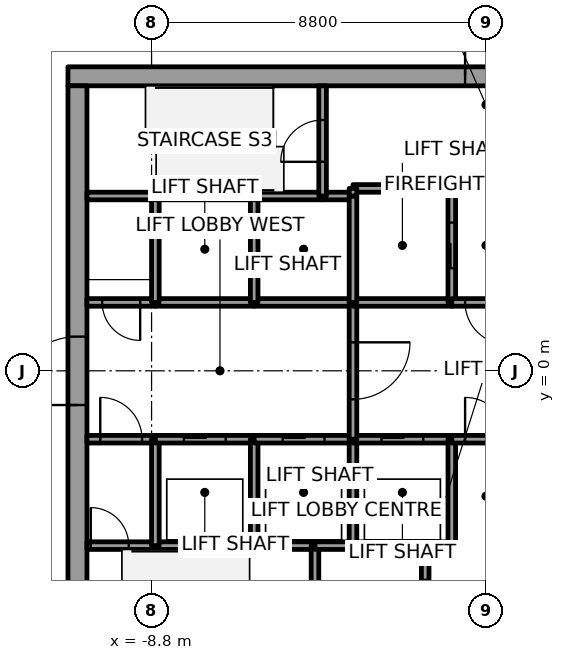
"""IFC4 building model, lengths in metres.
Left out: names, types, materials, properties, quantities, classifications, styles, units other than length and angle.
Written with IfcOpenShell. Run it as: python <this file> out.ifc"""

import sys

from ifc_helpers import new_model, si_unit, direction, frame, frame_2d, origin, place, context, subcontext, project, spatial, rectangle, extrude, element, fill, save


model = new_model("IFC4")
c1 = context("Model", 3, precision=1e-05, world=origin(), true_north=direction((0.0, 1.0)))
c2 = subcontext(c1, "Body", "Model", "MODEL_VIEW")
j1 = project(units=[si_unit("LENGTHUNIT", "METRE"), si_unit("PLANEANGLEUNIT", "RADIAN")], contexts=[c1])
p1 = place(None, origin())
s1 = spatial("IfcSite", under=j1, at=p1, CompositionType="ELEMENT")
p2 = place(p1, origin())
s2 = spatial("IfcBuilding", under=s1, at=p2, CompositionType="ELEMENT")
p3 = place(p2, frame((0.0, 0.0, 169.8)))
s3 = spatial("IfcBuildingStorey", under=s2, at=p3, CompositionType="ELEMENT", Elevation=169.8)
p4 = place(p3, frame((-11.0, 7.75, 0.0), z_axis=(0.0, 0.0, 1.0), x_axis=(1.0, 0.0, 0.0)))
e1 = element("IfcWall", 1, at=p4, inside=s3, PredefinedType="SHEAR", context=c2, shape_type="SweptSolid", body=[
    extrude(rectangle(XDim=22.0, YDim=0.5, at=frame_2d((11.0, 0.0))), origin(), (0.0, 0.0, 1.0), 4.0),
])
p5 = place(p4, frame((10.45, 0.0, 0.0)))
e2 = element("IfcOpeningElement", 2, at=p5, cuts=e1, PredefinedType="OPENING", context=c2, shape_type="SweptSolid", body=[
    extrude(rectangle(XDim=1.1, YDim=2.1, at=frame_2d((0.55, 1.05))), frame((0.0, 0.25, 0.0), z_axis=(0.0, -1.0, 0.0), x_axis=(1.0, 0.0, 0.0)), (0.0, 0.0, 1.0), 0.5),
])
p6 = place(p3, frame((-10.75, -7.5, 0.0), z_axis=(0.0, 0.0, 1.0), x_axis=(0.0, 1.0, 0.0)))
e3 = element("IfcWall", 3, at=p6, inside=s3, PredefinedType="SHEAR", context=c2, shape_type="SweptSolid", body=[
    extrude(rectangle(XDim=15.0, YDim=0.5, at=frame_2d((7.5, 0.0))), origin(), (0.0, 0.0, 1.0), 4.0),
])
p7 = place(p6, frame((6.6, 0.0, 0.0)))
e4 = element("IfcOpeningElement", 4, at=p7, cuts=e3, PredefinedType="OPENING", context=c2, shape_type="SweptSolid", body=[
    extrude(rectangle(XDim=1.8, YDim=2.1, at=frame_2d((0.9, 1.05))), frame((0.0, 0.25, 0.0), z_axis=(0.0, -1.0, 0.0), x_axis=(1.0, 0.0, 0.0)), (0.0, 0.0, 1.0), 0.5),
])
p8 = place(p3, frame((-10.5, -4.6, 0.0), z_axis=(0.0, 0.0, 1.0), x_axis=(1.0, 0.0, 0.0)))
e5 = element("IfcWall", 5, at=p8, inside=s3, PredefinedType="SOLIDWALL", context=c2, shape_type="SweptSolid", body=[
    extrude(rectangle(XDim=1.8, YDim=0.2, at=frame_2d((0.9, 0.0))), origin(), (0.0, 0.0, 1.0), 3.85),
])
p9 = place(p8, frame((0.1, 0.0, 0.0)))
e6 = element("IfcOpeningElement", 6, at=p9, cuts=e5, PredefinedType="OPENING", context=c2, shape_type="SweptSolid", body=[
    extrude(rectangle(XDim=1.0, YDim=2.1, at=frame_2d((0.5, 1.05))), frame((0.0, 0.1, 0.0), z_axis=(0.0, -1.0, 0.0), x_axis=(1.0, 0.0, 0.0)), (0.0, 0.0, 1.0), 0.2),
])
p10 = place(p3, frame((-10.5, -1.8, 0.0), z_axis=(0.0, 0.0, 1.0), x_axis=(1.0, 0.0, 0.0)))
e7 = element("IfcWall", 7, at=p10, inside=s3, PredefinedType="SOLIDWALL", context=c2, shape_type="SweptSolid", body=[
    extrude(rectangle(XDim=1.8, YDim=0.2, at=frame_2d((0.9, 0.0))), origin(), (0.0, 0.0, 1.0), 3.85),
])
p11 = place(p10, frame((0.35, 0.0, 0.0)))
e8 = element("IfcOpeningElement", 8, at=p11, cuts=e7, PredefinedType="OPENING", context=c2, shape_type="SweptSolid", body=[
    extrude(rectangle(XDim=1.1, YDim=2.1, at=frame_2d((0.55, 1.05))), frame((0.0, 0.1, 0.0), z_axis=(0.0, -1.0, 0.0), x_axis=(1.0, 0.0, 0.0)), (0.0, 0.0, 1.0), 0.2),
])
p12 = place(p3, frame((-8.7, 1.8, 0.0), z_axis=(0.0, 0.0, 1.0), x_axis=(-1.0, 0.0, 0.0)))
e9 = element("IfcWall", 9, at=p12, inside=s3, PredefinedType="SOLIDWALL", context=c2, shape_type="SweptSolid", body=[
    extrude(rectangle(XDim=1.8, YDim=0.2, at=frame_2d((0.9, 0.0))), origin(), (0.0, 0.0, 1.0), 3.85),
])
p13 = place(p12, frame((0.4, 0.0, 0.0)))
e10 = element("IfcOpeningElement", 10, at=p13, cuts=e9, PredefinedType="OPENING", context=c2, shape_type="SweptSolid", body=[
    extrude(rectangle(XDim=1.0, YDim=2.1, at=frame_2d((0.5, 1.05))), frame((0.0, 0.1, 0.0), z_axis=(0.0, -1.0, 0.0), x_axis=(1.0, 0.0, 0.0)), (0.0, 0.0, 1.0), 0.2),
])
p14 = place(p3, frame((-8.7, 4.6, 0.0), z_axis=(0.0, 0.0, 1.0), x_axis=(-1.0, 0.0, 0.0)))
e11 = element("IfcWall", 11, at=p14, inside=s3, PredefinedType="SOLIDWALL", context=c2, shape_type="SweptSolid", body=[
    extrude(rectangle(XDim=1.8, YDim=0.2, at=frame_2d((0.9, 0.0))), origin(), (0.0, 0.0, 1.0), 3.85),
])
p15 = place(p3, frame((-8.7, -4.6, 0.0), z_axis=(0.0, 0.0, 1.0), x_axis=(1.0, 0.0, 0.0)))
e12 = element("IfcWall", 12, at=p15, inside=s3, PredefinedType="SOLIDWALL", context=c2, shape_type="SweptSolid", body=[
    extrude(rectangle(XDim=2.6, YDim=0.2, at=frame_2d((1.3, 0.0))), origin(), (0.0, 0.0, 1.0), 3.85),
])
p16 = place(p3, frame((-8.7, -4.6, 0.0), z_axis=(0.0, 0.0, 1.0), x_axis=(0.0, 1.0, 0.0)))
e13 = element("IfcWall", 13, at=p16, inside=s3, PredefinedType="SOLIDWALL", context=c2, shape_type="SweptSolid", body=[
    extrude(rectangle(XDim=2.8, YDim=0.2, at=frame_2d((1.4, 0.0))), origin(), (0.0, 0.0, 1.0), 3.85),
])
p17 = place(p3, frame((-8.7, -1.8, 0.0), z_axis=(0.0, 0.0, 1.0), x_axis=(1.0, 0.0, 0.0)))
e14 = element("IfcWall", 14, at=p17, inside=s3, PredefinedType="SOLIDWALL", context=c2, shape_type="SweptSolid", body=[
    extrude(rectangle(XDim=2.6, YDim=0.2, at=frame_2d((1.3, 0.0))), origin(), (0.0, 0.0, 1.0), 3.85),
])
p18 = place(p17, frame((0.75, 0.0, 0.0)))
e15 = element("IfcOpeningElement", 15, at=p18, cuts=e14, PredefinedType="OPENING", context=c2, shape_type="SweptSolid", body=[
    extrude(rectangle(XDim=1.1, YDim=2.1, at=frame_2d((0.55, 1.05))), frame((0.0, 0.1, 0.0), z_axis=(0.0, -1.0, 0.0), x_axis=(1.0, 0.0, 0.0)), (0.0, 0.0, 1.0), 0.2),
])
p19 = place(p3, frame((-6.1, 1.8, 0.0), z_axis=(0.0, 0.0, 1.0), x_axis=(-1.0, 0.0, 0.0)))
e16 = element("IfcWall", 16, at=p19, inside=s3, PredefinedType="SOLIDWALL", context=c2, shape_type="SweptSolid", body=[
    extrude(rectangle(XDim=2.6, YDim=0.2, at=frame_2d((1.3, 0.0))), origin(), (0.0, 0.0, 1.0), 3.85),
])
p20 = place(p3, frame((-8.7, 1.8, 0.0), z_axis=(0.0, 0.0, 1.0), x_axis=(0.0, 1.0, 0.0)))
e17 = element("IfcWall", 17, at=p20, inside=s3, PredefinedType="SOLIDWALL", context=c2, shape_type="SweptSolid", body=[
    extrude(rectangle(XDim=2.8, YDim=0.2, at=frame_2d((1.4, 0.0))), origin(), (0.0, 0.0, 1.0), 3.85),
])
p21 = place(p3, frame((-6.1, 4.6, 0.0), z_axis=(0.0, 0.0, 1.0), x_axis=(-1.0, 0.0, 0.0)))
e18 = element("IfcWall", 18, at=p21, inside=s3, PredefinedType="SOLIDWALL", context=c2, shape_type="SweptSolid", body=[
    extrude(rectangle(XDim=2.6, YDim=0.2, at=frame_2d((1.3, 0.0))), origin(), (0.0, 0.0, 1.0), 3.85),
])
p22 = place(p3, frame((-6.1, -4.6, 0.0), z_axis=(0.0, 0.0, 1.0), x_axis=(1.0, 0.0, 0.0)))
e19 = element("IfcWall", 19, at=p22, inside=s3, PredefinedType="SOLIDWALL", context=c2, shape_type="SweptSolid", body=[
    extrude(rectangle(XDim=1.6, YDim=0.2, at=frame_2d((0.8, 0.0))), origin(), (0.0, 0.0, 1.0), 3.85),
])
p23 = place(p3, frame((-6.1, -4.6, 0.0), z_axis=(0.0, 0.0, 1.0), x_axis=(0.0, 1.0, 0.0)))
e20 = element("IfcWall", 20, at=p23, inside=s3, PredefinedType="SOLIDWALL", context=c2, shape_type="SweptSolid", body=[
    extrude(rectangle(XDim=2.8, YDim=0.2, at=frame_2d((1.4, 0.0))), origin(), (0.0, 0.0, 1.0), 3.85),
])
p24 = place(p3, frame((-6.1, -1.8, 0.0), z_axis=(0.0, 0.0, 1.0), x_axis=(1.0, 0.0, 0.0)))
e21 = element("IfcWall", 21, at=p24, inside=s3, PredefinedType="SOLIDWALL", context=c2, shape_type="SweptSolid", body=[
    extrude(rectangle(XDim=2.6, YDim=0.2, at=frame_2d((1.3, 0.0))), origin(), (0.0, 0.0, 1.0), 3.85),
])
p25 = place(p24, frame((0.75, 0.0, 0.0)))
e22 = element("IfcOpeningElement", 22, at=p25, cuts=e21, PredefinedType="OPENING", context=c2, shape_type="SweptSolid", body=[
    extrude(rectangle(XDim=1.1, YDim=2.1, at=frame_2d((0.55, 1.05))), frame((0.0, 0.1, 0.0), z_axis=(0.0, -1.0, 0.0), x_axis=(1.0, 0.0, 0.0)), (0.0, 0.0, 1.0), 0.2),
])
p26 = place(p3, frame((-3.5, 1.8, 0.0), z_axis=(0.0, 0.0, 1.0), x_axis=(-1.0, 0.0, 0.0)))
e23 = element("IfcWall", 23, at=p26, inside=s3, PredefinedType="SOLIDWALL", context=c2, shape_type="SweptSolid", body=[
    extrude(rectangle(XDim=2.6, YDim=0.2, at=frame_2d((1.3, 0.0))), origin(), (0.0, 0.0, 1.0), 3.85),
])
p27 = place(p3, frame((-6.1, 1.8, 0.0), z_axis=(0.0, 0.0, 1.0), x_axis=(0.0, 1.0, 0.0)))
e24 = element("IfcWall", 24, at=p27, inside=s3, PredefinedType="SOLIDWALL", context=c2, shape_type="SweptSolid", body=[
    extrude(rectangle(XDim=2.8, YDim=0.2, at=frame_2d((1.4, 0.0))), origin(), (0.0, 0.0, 1.0), 3.85),
])
p28 = place(p3, frame((-4.3, 4.6, 0.0), z_axis=(0.0, 0.0, 1.0), x_axis=(-1.0, 0.0, 0.0)))
e25 = element("IfcWall", 25, at=p28, inside=s3, PredefinedType="SOLIDWALL", context=c2, shape_type="SweptSolid", body=[
    extrude(rectangle(XDim=1.8, YDim=0.2, at=frame_2d((0.9, 0.0))), origin(), (0.0, 0.0, 1.0), 3.85),
])
p29 = place(p3, frame((-4.5, -4.6, 0.0), z_axis=(0.0, 0.0, 1.0), x_axis=(0.0, -1.0, 0.0)))
e26 = element("IfcWall", 26, at=p29, inside=s3, PredefinedType="SOLIDWALL", context=c2, shape_type="SweptSolid", body=[
    extrude(rectangle(XDim=2.9, YDim=0.2, at=frame_2d((1.45, 0.0))), origin(), (0.0, 0.0, 1.0), 3.85),
])
p30 = place(p3, frame((-4.5, -4.6, 0.0), z_axis=(0.0, 0.0, 1.0), x_axis=(1.0, 0.0, 0.0)))
e27 = element("IfcWall", 27, at=p30, inside=s3, PredefinedType="SOLIDWALL", context=c2, shape_type="SweptSolid", body=[
    extrude(rectangle(XDim=1.0, YDim=0.2, at=frame_2d((0.5, 0.0))), origin(), (0.0, 0.0, 1.0), 3.85),
])
p31 = place(p3, frame((-3.5, 4.6, 0.0), z_axis=(0.0, 0.0, 1.0), x_axis=(-1.0, 0.0, 0.0)))
e28 = element("IfcWall", 28, at=p31, inside=s3, PredefinedType="SOLIDWALL", context=c2, shape_type="SweptSolid", body=[
    extrude(rectangle(XDim=0.8, YDim=0.2, at=frame_2d((0.4, 0.0))), origin(), (0.0, 0.0, 1.0), 3.85),
])
p32 = place(p3, frame((-4.3, 4.6, 0.0), z_axis=(0.0, 0.0, 1.0), x_axis=(0.0, 1.0, 0.0)))
e29 = element("IfcWall", 29, at=p32, inside=s3, PredefinedType="SOLIDWALL", context=c2, shape_type="SweptSolid", body=[
    extrude(rectangle(XDim=2.9, YDim=0.2, at=frame_2d((1.45, 0.0))), origin(), (0.0, 0.0, 1.0), 3.85),
])
p33 = place(p32, frame((0.9, 0.0, 0.0)))
e30 = element("IfcOpeningElement", 30, at=p33, cuts=e29, PredefinedType="OPENING", context=c2, shape_type="SweptSolid", body=[
    extrude(rectangle(XDim=1.1, YDim=2.1, at=frame_2d((0.55, 1.05))), frame((0.0, 0.1, 0.0), z_axis=(0.0, -1.0, 0.0), x_axis=(1.0, 0.0, 0.0)), (0.0, 0.0, 1.0), 0.2),
])
p34 = place(p3, frame((-3.5, -4.6, 0.0), z_axis=(0.0, 0.0, 1.0), x_axis=(1.0, 0.0, 0.0)))
e31 = element("IfcWall", 31, at=p34, inside=s3, PredefinedType="SOLIDWALL", context=c2, shape_type="SweptSolid", body=[
    extrude(rectangle(XDim=1.9, YDim=0.2, at=frame_2d((0.95, 0.0))), origin(), (0.0, 0.0, 1.0), 3.85),
])
p35 = place(p3, frame((-3.5, -4.6, 0.0), z_axis=(0.0, 0.0, 1.0), x_axis=(0.0, 1.0, 0.0)))
e32 = element("IfcWall", 32, at=p35, inside=s3, PredefinedType="SOLIDWALL", context=c2, shape_type="SweptSolid", body=[
    extrude(rectangle(XDim=2.8, YDim=0.2, at=frame_2d((1.4, 0.0))), origin(), (0.0, 0.0, 1.0), 3.85),
])
p36 = place(p3, frame((-3.5, -1.8, 0.0), z_axis=(0.0, 0.0, 1.0), x_axis=(1.0, 0.0, 0.0)))
e33 = element("IfcWall", 33, at=p36, inside=s3, PredefinedType="SOLIDWALL", context=c2, shape_type="SweptSolid", body=[
    extrude(rectangle(XDim=2.6, YDim=0.2, at=frame_2d((1.3, 0.0))), origin(), (0.0, 0.0, 1.0), 3.85),
])
p37 = place(p36, frame((0.75, 0.0, 0.0)))
e34 = element("IfcOpeningElement", 34, at=p37, cuts=e33, PredefinedType="OPENING", context=c2, shape_type="SweptSolid", body=[
    extrude(rectangle(XDim=1.1, YDim=2.1, at=frame_2d((0.55, 1.05))), frame((0.0, 0.1, 0.0), z_axis=(0.0, -1.0, 0.0), x_axis=(1.0, 0.0, 0.0)), (0.0, 0.0, 1.0), 0.2),
])
p38 = place(p3, frame((-3.5, 1.8, 0.0), z_axis=(0.0, 0.0, 1.0), x_axis=(0.0, -1.0, 0.0)))
e35 = element("IfcWall", 35, at=p38, inside=s3, PredefinedType="SOLIDWALL", context=c2, shape_type="SweptSolid", body=[
    extrude(rectangle(XDim=3.6, YDim=0.2, at=frame_2d((1.8, 0.0))), origin(), (0.0, 0.0, 1.0), 3.85),
])
p39 = place(p38, frame((1.05, 0.0, 0.0)))
e36 = element("IfcOpeningElement", 36, at=p39, cuts=e35, PredefinedType="OPENING", context=c2, shape_type="SweptSolid", body=[
    extrude(rectangle(XDim=1.5, YDim=2.1, at=frame_2d((0.75, 1.05))), frame((0.0, 0.1, 0.0), z_axis=(0.0, -1.0, 0.0), x_axis=(1.0, 0.0, 0.0)), (0.0, 0.0, 1.0), 0.2),
])
p40 = place(p3, frame((-0.9, 1.8, 0.0), z_axis=(0.0, 0.0, 1.0), x_axis=(-1.0, 0.0, 0.0)))
e37 = element("IfcWall", 37, at=p40, inside=s3, PredefinedType="SOLIDWALL", context=c2, shape_type="SweptSolid", body=[
    extrude(rectangle(XDim=2.6, YDim=0.2, at=frame_2d((1.3, 0.0))), origin(), (0.0, 0.0, 1.0), 3.85),
])
p41 = place(p3, frame((-3.5, 4.6, 0.0), z_axis=(0.0, 0.0, 1.0), x_axis=(0.0, -1.0, 0.0)))
e38 = element("IfcWall", 38, at=p41, inside=s3, PredefinedType="SOLIDWALL", context=c2, shape_type="SweptSolid", body=[
    extrude(rectangle(XDim=2.8, YDim=0.2, at=frame_2d((1.4, 0.0))), origin(), (0.0, 0.0, 1.0), 3.85),
])
p42 = place(p3, frame((-0.9, 1.8, 0.0), z_axis=(0.0, 0.0, 1.0), x_axis=(0.0, 1.0, 0.0)))
e39 = element("IfcWall", 39, at=p42, inside=s3, PredefinedType="SOLIDWALL", context=c2, shape_type="SweptSolid", body=[
    extrude(rectangle(XDim=3.0, YDim=0.2, at=frame_2d((1.5, 0.0))), origin(), (0.0, 0.0, 1.0), 3.85),
])
p43 = place(p42, frame((0.9, 0.0, 0.0)))
e40 = element("IfcOpeningElement", 40, at=p43, cuts=e39, PredefinedType="OPENING", context=c2, shape_type="SweptSolid", body=[
    extrude(rectangle(XDim=1.2, YDim=2.1, at=frame_2d((0.6, 1.05))), frame((0.0, 0.1, 0.0), z_axis=(0.0, -1.0, 0.0), x_axis=(1.0, 0.0, 0.0)), (0.0, 0.0, 1.0), 0.2),
])
p44 = place(p3, frame((-0.9, 4.8, 0.0), z_axis=(0.0, 0.0, 1.0), x_axis=(-1.0, 0.0, 0.0)))
e41 = element("IfcWall", 41, at=p44, inside=s3, PredefinedType="SOLIDWALL", context=c2, shape_type="SweptSolid", body=[
    extrude(rectangle(XDim=2.6, YDim=0.2, at=frame_2d((1.3, 0.0))), origin(), (0.0, 0.0, 1.0), 3.85),
])
p45 = place(p3, frame((-3.5, 4.8, 0.0), z_axis=(0.0, 0.0, 1.0), x_axis=(0.0, -1.0, 0.0)))
e42 = element("IfcWall", 42, at=p45, inside=s3, PredefinedType="SOLIDWALL", context=c2, shape_type="SweptSolid", body=[
    extrude(rectangle(XDim=0.2, YDim=0.2, at=frame_2d((0.1, 0.0))), origin(), (0.0, 0.0, 1.0), 3.85),
])
p46 = place(p3, frame((-1.6, -7.5, 0.0), z_axis=(0.0, 0.0, 1.0), x_axis=(0.0, 1.0, 0.0)))
e43 = element("IfcWall", 43, at=p46, inside=s3, PredefinedType="SOLIDWALL", context=c2, shape_type="SweptSolid", body=[
    extrude(rectangle(XDim=2.9, YDim=0.2, at=frame_2d((1.45, 0.0))), origin(), (0.0, 0.0, 1.0), 3.85),
])
p47 = place(p46, frame((0.9, 0.0, 0.0)))
e44 = element("IfcOpeningElement", 44, at=p47, cuts=e43, PredefinedType="OPENING", context=c2, shape_type="SweptSolid", body=[
    extrude(rectangle(XDim=1.1, YDim=2.1, at=frame_2d((0.55, 1.05))), frame((0.0, 0.1, 0.0), z_axis=(0.0, -1.0, 0.0), x_axis=(1.0, 0.0, 0.0)), (0.0, 0.0, 1.0), 0.2),
])
p48 = place(p3, frame((-1.6, -4.6, 0.0), z_axis=(0.0, 0.0, 1.0), x_axis=(1.0, 0.0, 0.0)))
e45 = element("IfcWall", 45, at=p48, inside=s3, PredefinedType="SOLIDWALL", context=c2, shape_type="SweptSolid", body=[
    extrude(rectangle(XDim=0.7, YDim=0.2, at=frame_2d((0.35, 0.0))), origin(), (0.0, 0.0, 1.0), 3.85),
])
p49 = place(p3, frame((-0.9, -4.6, 0.0), z_axis=(0.0, 0.0, 1.0), x_axis=(0.0, 1.0, 0.0)))
e46 = element("IfcWall", 46, at=p49, inside=s3, PredefinedType="SOLIDWALL", context=c2, shape_type="SweptSolid", body=[
    extrude(rectangle(XDim=2.8, YDim=0.2, at=frame_2d((1.4, 0.0))), origin(), (0.0, 0.0, 1.0), 3.85),
])
p50 = place(p3, frame((-0.9, -1.8, 0.0), z_axis=(0.0, 0.0, 1.0), x_axis=(1.0, 0.0, 0.0)))
e47 = element("IfcWall", 47, at=p50, inside=s3, PredefinedType="SOLIDWALL", context=c2, shape_type="SweptSolid", body=[
    extrude(rectangle(XDim=1.8, YDim=0.2, at=frame_2d((0.9, 0.0))), origin(), (0.0, 0.0, 1.0), 3.85),
])
p51 = place(p50, frame((0.35, 0.0, 0.0)))
e48 = element("IfcOpeningElement", 48, at=p51, cuts=e47, PredefinedType="OPENING", context=c2, shape_type="SweptSolid", body=[
    extrude(rectangle(XDim=1.1, YDim=2.1, at=frame_2d((0.55, 1.05))), frame((0.0, 0.1, 0.0), z_axis=(0.0, -1.0, 0.0), x_axis=(1.0, 0.0, 0.0)), (0.0, 0.0, 1.0), 0.2),
])
p52 = place(p3, frame((0.9, 1.8, 0.0), z_axis=(0.0, 0.0, 1.0), x_axis=(-1.0, 0.0, 0.0)))
e49 = element("IfcWall", 49, at=p52, inside=s3, PredefinedType="SOLIDWALL", context=c2, shape_type="SweptSolid", body=[
    extrude(rectangle(XDim=1.8, YDim=0.2, at=frame_2d((0.9, 0.0))), origin(), (0.0, 0.0, 1.0), 3.85),
])
p53 = place(p52, frame((0.35, 0.0, 0.0)))
e50 = element("IfcOpeningElement", 50, at=p53, cuts=e49, PredefinedType="OPENING", context=c2, shape_type="SweptSolid", body=[
    extrude(rectangle(XDim=1.1, YDim=2.1, at=frame_2d((0.55, 1.05))), frame((0.0, 0.1, 0.0), z_axis=(0.0, -1.0, 0.0), x_axis=(1.0, 0.0, 0.0)), (0.0, 0.0, 1.0), 0.2),
])
p54 = place(p18, origin())
e51 = element("IfcDoor", 51, at=p54, inside=s3, OperationType="SLIDING_TO_RIGHT", PredefinedType="DOOR", context=c2, shape_type="SweptSolid", body=[
    extrude(rectangle(XDim=1.1, YDim=2.1, at=frame_2d((0.55, 1.05))), frame((0.0, 0.025, 0.0), z_axis=(0.0, -1.0, 0.0), x_axis=(1.0, 0.0, 0.0)), (0.0, 0.0, 1.0), 0.05),
])
fill(e15, e51)
p55 = place(p25, origin())
e52 = element("IfcDoor", 52, at=p55, inside=s3, OperationType="SLIDING_TO_LEFT", PredefinedType="DOOR", context=c2, shape_type="SweptSolid", body=[
    extrude(rectangle(XDim=1.1, YDim=2.1, at=frame_2d((0.55, 1.05))), frame((0.0, 0.025, 0.0), z_axis=(0.0, -1.0, 0.0), x_axis=(1.0, 0.0, 0.0)), (0.0, 0.0, 1.0), 0.05),
])
fill(e22, e52)
p56 = place(p37, origin())
e53 = element("IfcDoor", 53, at=p56, inside=s3, OperationType="SLIDING_TO_RIGHT", PredefinedType="DOOR", context=c2, shape_type="SweptSolid", body=[
    extrude(rectangle(XDim=1.1, YDim=2.1, at=frame_2d((0.55, 1.05))), frame((0.0, 0.025, 0.0), z_axis=(0.0, -1.0, 0.0), x_axis=(1.0, 0.0, 0.0)), (0.0, 0.0, 1.0), 0.05),
])
fill(e34, e53)
p57 = place(p43, origin())
e54 = element("IfcDoor", 54, at=p57, inside=s3, OperationType="SLIDING_TO_LEFT", PredefinedType="DOOR", context=c2, shape_type="SweptSolid", body=[
    extrude(rectangle(XDim=1.2, YDim=2.1, at=frame_2d((0.6, 1.05))), frame((0.0, 0.025, 0.0), z_axis=(0.0, -1.0, 0.0), x_axis=(1.0, 0.0, 0.0)), (0.0, 0.0, 1.0), 0.05),
])
fill(e40, e54)
p58 = place(p39, origin())
e55 = element("IfcDoor", 55, at=p58, inside=s3, OperationType="DOUBLE_DOOR_SINGLE_SWING", PredefinedType="DOOR", context=c2, shape_type="SweptSolid", body=[
    extrude(rectangle(XDim=1.5, YDim=2.1, at=frame_2d((0.75, 1.05))), frame((0.0, 0.025, 0.0), z_axis=(0.0, -1.0, 0.0), x_axis=(1.0, 0.0, 0.0)), (0.0, 0.0, 1.0), 0.05),
])
fill(e36, e55)
p59 = place(p11, origin())
e56 = element("IfcDoor", 56, at=p59, inside=s3, OperationType="SINGLE_SWING_RIGHT", PredefinedType="DOOR", context=c2, shape_type="SweptSolid", body=[
    extrude(rectangle(XDim=1.1, YDim=2.1, at=frame_2d((0.55, 1.05))), frame((0.0, 0.025, 0.0), z_axis=(0.0, -1.0, 0.0), x_axis=(1.0, 0.0, 0.0)), (0.0, 0.0, 1.0), 0.05),
])
fill(e8, e56)
p60 = place(p53, origin())
e57 = element("IfcDoor", 57, at=p60, inside=s3, OperationType="SINGLE_SWING_LEFT", PredefinedType="DOOR", context=c2, shape_type="SweptSolid", body=[
    extrude(rectangle(XDim=1.1, YDim=2.1, at=frame_2d((0.55, 1.05))), frame((0.0, 0.025, 0.0), z_axis=(0.0, -1.0, 0.0), x_axis=(1.0, 0.0, 0.0)), (0.0, 0.0, 1.0), 0.05),
])
fill(e50, e57)
p61 = place(p51, origin())
e58 = element("IfcDoor", 58, at=p61, inside=s3, OperationType="SINGLE_SWING_LEFT", PredefinedType="DOOR", context=c2, shape_type="SweptSolid", body=[
    extrude(rectangle(XDim=1.1, YDim=2.1, at=frame_2d((0.55, 1.05))), frame((0.0, 0.025, 0.0), z_axis=(0.0, -1.0, 0.0), x_axis=(1.0, 0.0, 0.0)), (0.0, 0.0, 1.0), 0.05),
])
fill(e48, e58)
p62 = place(p13, origin())
e59 = element("IfcDoor", 59, at=p62, inside=s3, OperationType="SINGLE_SWING_LEFT", PredefinedType="DOOR", context=c2, shape_type="SweptSolid", body=[
    extrude(rectangle(XDim=1.0, YDim=2.1, at=frame_2d((0.5, 1.05))), frame((0.0, 0.025, 0.0), z_axis=(0.0, -1.0, 0.0), x_axis=(1.0, 0.0, 0.0)), (0.0, 0.0, 1.0), 0.05),
])
fill(e10, e59)
p63 = place(p9, origin())
e60 = element("IfcDoor", 60, at=p63, inside=s3, OperationType="SINGLE_SWING_LEFT", PredefinedType="DOOR", context=c2, shape_type="SweptSolid", body=[
    extrude(rectangle(XDim=1.0, YDim=2.1, at=frame_2d((0.5, 1.05))), frame((0.0, 0.025, 0.0), z_axis=(0.0, -1.0, 0.0), x_axis=(1.0, 0.0, 0.0)), (0.0, 0.0, 1.0), 0.05),
])
fill(e6, e60)
p64 = place(p33, origin())
e61 = element("IfcDoor", 61, at=p64, inside=s3, OperationType="SINGLE_SWING_LEFT", PredefinedType="DOOR", context=c2, shape_type="SweptSolid", body=[
    extrude(rectangle(XDim=1.1, YDim=2.1, at=frame_2d((0.55, 1.05))), frame((0.0, 0.025, 0.0), z_axis=(0.0, -1.0, 0.0), x_axis=(1.0, 0.0, 0.0)), (0.0, 0.0, 1.0), 0.05),
])
fill(e30, e61)
p65 = place(p7, origin())
e62 = element("IfcDoor", 62, at=p65, inside=s3, OperationType="DOUBLE_DOOR_SINGLE_SWING", PredefinedType="DOOR", context=c2, shape_type="SweptSolid", body=[
    extrude(rectangle(XDim=1.8, YDim=2.1, at=frame_2d((0.9, 1.05))), frame((0.0, 0.025, 0.0), z_axis=(0.0, -1.0, 0.0), x_axis=(1.0, 0.0, 0.0)), (0.0, 0.0, 1.0), 0.05),
])
fill(e4, e62)
p66 = place(p5, origin())
e63 = element("IfcDoor", 63, at=p66, inside=s3, OperationType="SINGLE_SWING_LEFT", PredefinedType="DOOR", context=c2, shape_type="SweptSolid", body=[
    extrude(rectangle(XDim=1.1, YDim=2.1, at=frame_2d((0.55, 1.05))), frame((0.0, 0.025, 0.0), z_axis=(0.0, -1.0, 0.0), x_axis=(1.0, 0.0, 0.0)), (0.0, 0.0, 1.0), 0.05),
])
fill(e2, e63)
save(model, sys.argv[1])
